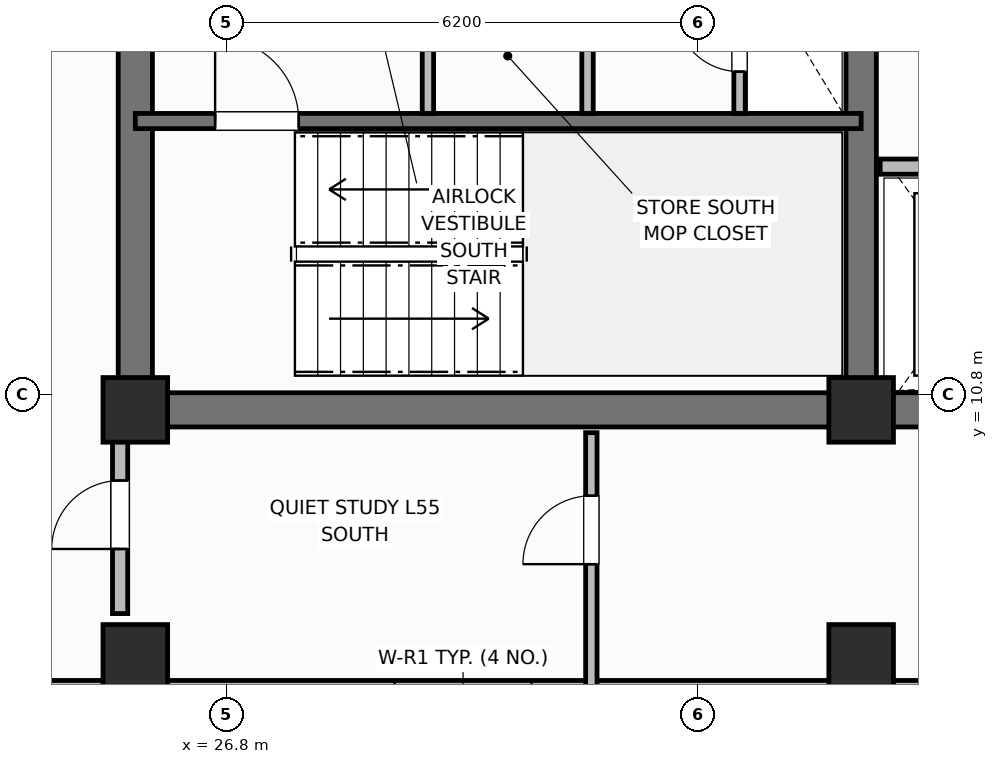
"""IFC4 building model, lengths in metres.
Left out: names, types, materials, properties, quantities, classifications, styles, units other than length and angle.
Written with IfcOpenShell. Run it as: python <this file> out.ifc"""

import sys

from ifc_helpers import new_model, si_unit, direction, frame, frame_2d, origin, origin_2d, place, context, subcontext, project, spatial, rectangle, extrude, element, fill, save


model = new_model("IFC4")
c1 = context("Model", 3, precision=1e-05, world=origin(), true_north=direction((0.0, 1.0)))
c2 = subcontext(c1, "Body", "Model", "MODEL_VIEW")
j1 = project(units=[si_unit("LENGTHUNIT", "METRE"), si_unit("PLANEANGLEUNIT", "RADIAN")], contexts=[c1])
p1 = place(None, origin())
s1 = spatial("IfcSite", under=j1, at=p1, CompositionType="ELEMENT")
p2 = place(p1, origin())
s2 = spatial("IfcBuilding", under=s1, at=p2, CompositionType="ELEMENT")
p3 = place(p2, frame((0.0, 0.0, 222.1)))
s3 = spatial("IfcBuildingStorey", under=s2, at=p3, CompositionType="ELEMENT", Elevation=222.1)
p4 = place(p3, frame((52.8, 10.6, 0.0), z_axis=(0.0, 0.0, 1.0), x_axis=(-1.0, 0.0, 0.0)))
e1 = element("IfcWall", 1, at=p4, inside=s3, PredefinedType="SHEAR", context=c2, shape_type="SweptSolid", body=[
    extrude(rectangle(XDim=27.2, YDim=0.45, at=frame_2d((13.6, 0.0))), origin(), (0.0, 0.0, 1.0), 3.7),
])
p5 = place(p3, frame((25.6, 10.825, 0.0), z_axis=(0.0, 0.0, 1.0), x_axis=(0.0, 1.0, 0.0)))
e2 = element("IfcWall", 2, at=p5, inside=s3, PredefinedType="SHEAR", context=c2, shape_type="SweptSolid", body=[
    extrude(rectangle(XDim=5.75, YDim=0.45, at=frame_2d((2.875, 0.0))), origin(), (0.0, 0.0, 1.0), 3.7),
])
p6 = place(p3, frame((35.15, 10.825, 0.0), z_axis=(0.0, 0.0, 1.0), x_axis=(0.0, 1.0, 0.0)))
e3 = element("IfcWall", 3, at=p6, inside=s3, PredefinedType="SHEAR", context=c2, shape_type="SweptSolid", body=[
    extrude(rectangle(XDim=5.75, YDim=0.4, at=frame_2d((2.875, 0.0))), origin(), (0.0, 0.0, 1.0), 3.7),
])
for number, where, z_axis, x_axis in (
    (4, (25.6, 10.6, 0.0), (0.0, 0.0, 1.0), (1.0, 0.0, 0.0)),
    (5, (35.15, 10.6, 0.0), (0.0, 0.0, 1.0), (1.0, 0.0, 0.0)),
    (6, (25.6, 7.35, 0.0), (0.0, 0.0, 1.0), (1.0, 0.0, 0.0)),
    (7, (35.15, 7.35, 0.0), (0.0, 0.0, 1.0), (1.0, 0.0, 0.0)),
):
    element("IfcColumn", number, at=place(p3, frame(where, z_axis=z_axis, x_axis=x_axis)), inside=s3, PredefinedType="COLUMN", context=c2, shape_type="SweptSolid", body=[
        extrude(rectangle(XDim=0.85, YDim=0.85, at=origin_2d()), origin(), (0.0, 0.0, 1.0), 3.7),
    ])
p7 = place(p3, frame((20.2, 6.87, 0.0), z_axis=(0.0, 0.0, 1.0), x_axis=(1.0, 0.0, 0.0)))
e8 = element("IfcWall", 8, at=p7, inside=s3, PredefinedType="SOLIDWALL", context=c2, shape_type="SweptSolid", body=[
    extrude(rectangle(XDim=15.8, YDim=0.34, at=frame_2d((7.9, 0.0))), origin(), (0.0, 0.0, 1.0), 2.26),
])
p8 = place(p7, frame((8.812, 0.0, 0.3)))
e9 = element("IfcOpeningElement", 9, at=p8, cuts=e8, PredefinedType="OPENING", context=c2, shape_type="SweptSolid", body=[
    extrude(rectangle(XDim=1.8, YDim=1.85, at=frame_2d((0.9, 0.925))), frame((0.0, 0.18, 0.0), z_axis=(0.0, -1.0, 0.0), x_axis=(1.0, 0.0, 0.0)), (0.0, 0.0, 1.0), 0.36),
])
p9 = place(p3, frame((25.6, 14.4, 0.0), z_axis=(0.0, 0.0, 1.0), x_axis=(1.0, 0.0, 0.0)))
e10 = element("IfcWall", 10, at=p9, inside=s3, PredefinedType="SHEAR", context=c2, shape_type="SweptSolid", body=[
    extrude(rectangle(XDim=9.55, YDim=0.2, at=frame_2d((4.775, 0.0))), origin(), (0.0, 0.0, 1.0), 3.7),
])
p10 = place(p9, frame((1.05, 0.0, 0.0)))
e11 = element("IfcOpeningElement", 11, at=p10, cuts=e10, PredefinedType="OPENING", context=c2, shape_type="SweptSolid", body=[
    extrude(rectangle(XDim=1.1, YDim=2.15, at=frame_2d((0.55, 1.075))), frame((0.0, 0.11, 0.0), z_axis=(0.0, -1.0, 0.0), x_axis=(1.0, 0.0, 0.0)), (0.0, 0.0, 1.0), 0.22),
])
for number, where, z_axis, x_axis in (
    (12, (29.45, 14.5, 0.0), (0.0, 0.0, 1.0), (0.0, 1.0, 0.0)),
    (13, (31.55, 14.5, 0.0), (0.0, 0.0, 1.0), (0.0, 1.0, 0.0)),
):
    element("IfcWall", number, at=place(p3, frame(where, z_axis=z_axis, x_axis=x_axis)), inside=s3, PredefinedType="PARTITIONING", context=c2, shape_type="SweptSolid", body=[
        extrude(rectangle(XDim=2.08, YDim=0.15, at=frame_2d((1.04, 0.0))), origin(), (0.0, 0.0, 1.0), 2.24),
    ])
p11 = place(p3, frame((33.55, 14.5, 0.0), z_axis=(0.0, 0.0, 1.0), x_axis=(0.0, 1.0, 0.0)))
e14 = element("IfcWall", 14, at=p11, inside=s3, PredefinedType="PARTITIONING", context=c2, shape_type="SweptSolid", body=[
    extrude(rectangle(XDim=2.08, YDim=0.15, at=frame_2d((1.04, 0.0))), origin(), (0.0, 0.0, 1.0), 2.24),
])
p12 = place(p11, frame((0.55, 0.0, 0.0)))
e15 = element("IfcOpeningElement", 15, at=p12, cuts=e14, PredefinedType="OPENING", context=c2, shape_type="SweptSolid", body=[
    extrude(rectangle(XDim=0.85, YDim=2.05, at=frame_2d((0.425, 1.025))), frame((0.0, 0.085, 0.0), z_axis=(0.0, -1.0, 0.0), x_axis=(1.0, 0.0, 0.0)), (0.0, 0.0, 1.0), 0.17),
])
p13 = place(p3, frame((35.4, 13.8, 0.0), z_axis=(0.0, 0.0, 1.0), x_axis=(1.0, 0.0, 0.0)))
e16 = element("IfcWall", 16, at=p13, inside=s3, PredefinedType="PARTITIONING", context=c2, shape_type="SweptSolid", body=[
    extrude(rectangle(XDim=7.6, YDim=0.2, at=frame_2d((3.8, 0.0))), origin(), (0.0, 0.0, 1.0), 2.18),
])
p14 = place(p13, frame((0.7, 0.0, 0.0)))
e17 = element("IfcOpeningElement", 17, at=p14, cuts=e16, PredefinedType="OPENING", context=c2, shape_type="SweptSolid", body=[
    extrude(rectangle(XDim=1.1, YDim=2.15, at=frame_2d((0.55, 1.075))), frame((0.0, 0.11, 0.0), z_axis=(0.0, -1.0, 0.0), x_axis=(1.0, 0.0, 0.0)), (0.0, 0.0, 1.0), 0.22),
])
p15 = place(p13, frame((3.35, 0.0, 0.0)))
e18 = element("IfcOpeningElement", 18, at=p15, cuts=e16, PredefinedType="OPENING", context=c2, shape_type="SweptSolid", body=[
    extrude(rectangle(XDim=1.2, YDim=2.15, at=frame_2d((0.6, 1.075))), frame((0.0, 0.11, 0.0), z_axis=(0.0, -1.0, 0.0), x_axis=(1.0, 0.0, 0.0)), (0.0, 0.0, 1.0), 0.22),
])
p16 = place(p3, frame((31.6, 6.87, 0.0), z_axis=(0.0, 0.0, 1.0), x_axis=(0.0, 1.0, 0.0)))
e19 = element("IfcWall", 19, at=p16, inside=s3, PredefinedType="PARTITIONING", context=c2, shape_type="SweptSolid", body=[
    extrude(rectangle(XDim=3.43, YDim=0.15, at=frame_2d((1.715, 0.0))), origin(), (0.0, 0.0, 1.0), 2.24),
])
p17 = place(p16, frame((1.7, 0.0, 0.0)))
e20 = element("IfcOpeningElement", 20, at=p17, cuts=e19, PredefinedType="OPENING", context=c2, shape_type="SweptSolid", body=[
    extrude(rectangle(XDim=0.9, YDim=2.1, at=frame_2d((0.45, 1.05))), frame((0.0, 0.085, 0.0), z_axis=(0.0, -1.0, 0.0), x_axis=(1.0, 0.0, 0.0)), (0.0, 0.0, 1.0), 0.17),
])
p18 = place(p3, frame((25.4, 7.92, 0.0), z_axis=(0.0, 0.0, 1.0), x_axis=(0.0, 1.0, 0.0)))
e21 = element("IfcWall", 21, at=p18, inside=s3, PredefinedType="PARTITIONING", context=c2, shape_type="SweptSolid", body=[
    extrude(rectangle(XDim=2.38, YDim=0.2, at=frame_2d((1.19, 0.0))), origin(), (0.0, 0.0, 1.0), 2.24),
])
p19 = place(p18, frame((0.85, 0.0, 0.0)))
e22 = element("IfcOpeningElement", 22, at=p19, cuts=e21, PredefinedType="OPENING", context=c2, shape_type="SweptSolid", body=[
    extrude(rectangle(XDim=0.9, YDim=2.1, at=frame_2d((0.45, 1.05))), frame((0.0, 0.11, 0.0), z_axis=(0.0, -1.0, 0.0), x_axis=(1.0, 0.0, 0.0)), (0.0, 0.0, 1.0), 0.22),
])
p20 = place(p10, origin())
e23 = element("IfcDoor", 23, at=p20, inside=s3, OperationType="SINGLE_SWING_LEFT", PredefinedType="DOOR", context=c2, shape_type="SweptSolid", body=[
    extrude(rectangle(XDim=1.1, YDim=2.15, at=frame_2d((0.55, 1.075))), frame((0.0, 0.025, 0.0), z_axis=(0.0, -1.0, 0.0), x_axis=(1.0, 0.0, 0.0)), (0.0, 0.0, 1.0), 0.05),
])
fill(e11, e23)
p21 = place(p12, origin())
e24 = element("IfcDoor", 24, at=p21, inside=s3, OperationType="SINGLE_SWING_RIGHT", PredefinedType="TRAPDOOR", context=c2, shape_type="SweptSolid", body=[
    extrude(rectangle(XDim=0.85, YDim=2.05, at=frame_2d((0.425, 1.025))), frame((0.0, 0.025, 0.0), z_axis=(0.0, -1.0, 0.0), x_axis=(1.0, 0.0, 0.0)), (0.0, 0.0, 1.0), 0.05),
])
fill(e15, e24)
p22 = place(p17, origin())
e25 = element("IfcDoor", 25, at=p22, inside=s3, OperationType="SINGLE_SWING_LEFT", PredefinedType="DOOR", context=c2, shape_type="SweptSolid", body=[
    extrude(rectangle(XDim=0.9, YDim=2.1, at=frame_2d((0.45, 1.05))), frame((0.0, 0.025, 0.0), z_axis=(0.0, -1.0, 0.0), x_axis=(1.0, 0.0, 0.0)), (0.0, 0.0, 1.0), 0.05),
])
fill(e20, e25)
p23 = place(p19, origin())
e26 = element("IfcDoor", 26, at=p23, inside=s3, OperationType="SINGLE_SWING_LEFT", PredefinedType="DOOR", context=c2, shape_type="SweptSolid", body=[
    extrude(rectangle(XDim=0.9, YDim=2.1, at=frame_2d((0.45, 1.05))), frame((0.0, 0.025, 0.0), z_axis=(0.0, -1.0, 0.0), x_axis=(1.0, 0.0, 0.0)), (0.0, 0.0, 1.0), 0.05),
])
fill(e22, e26)
save(model, sys.argv[1])
